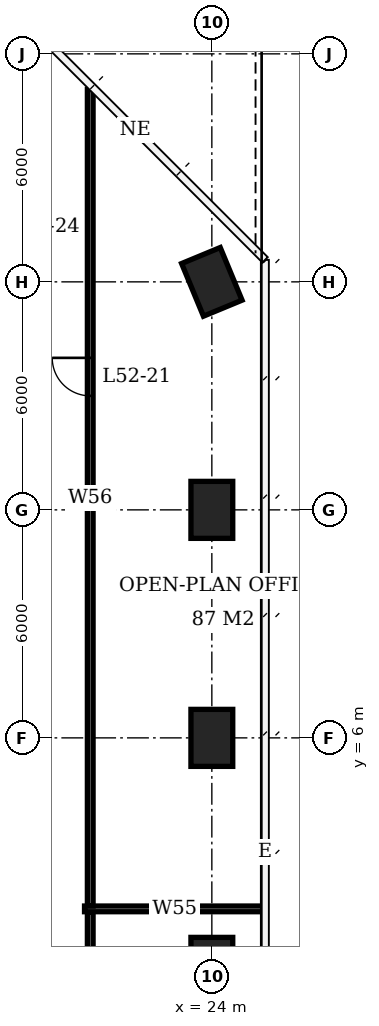
"""IFC4 building model, lengths in metres.
Left out: names, types, materials, properties, quantities, classifications, styles, units other than length and angle.
Written with IfcOpenShell. Run it as: python <this file> out.ifc"""

import sys

from ifc_helpers import new_model, si_unit, direction, frame, frame_2d, origin, origin_2d, place, context, subcontext, project, spatial, rectangle, extrude, element, fill, save


model = new_model("IFC4")
c1 = context("Model", 3, precision=1e-05, world=origin(), true_north=direction((0.0, 1.0)))
c2 = subcontext(c1, "Body", "Model", "MODEL_VIEW")
j1 = project(units=[si_unit("LENGTHUNIT", "METRE"), si_unit("PLANEANGLEUNIT", "RADIAN")], contexts=[c1])
p1 = place(None, origin())
s1 = spatial("IfcSite", under=j1, at=p1, CompositionType="ELEMENT")
p2 = place(p1, origin())
s2 = spatial("IfcBuilding", under=s1, at=p2, CompositionType="ELEMENT")
p3 = place(p2, frame((0.0, 0.0, 212.3)))
s3 = spatial("IfcBuildingStorey", under=s2, at=p3, CompositionType="ELEMENT", Elevation=212.3)
for number, where, z_axis, x_axis in (
    (1, (24.0, 0.0, 0.0), (0.0, 0.0, 1.0), (0.0, 1.0, 0.0)),
    (2, (24.0, 6.0, 0.0), (0.0, 0.0, 1.0), (0.0, 1.0, 0.0)),
    (3, (24.0, 12.0, 0.0), (0.0, 0.0, 1.0), (0.0, 1.0, 0.0)),
    (4, (24.0, 18.0, 0.0), (0.0, 0.0, 1.0), (0.383, -0.924, 0.0)),
):
    element("IfcColumn", number, at=place(p3, frame(where, z_axis=z_axis, x_axis=x_axis)), inside=s3, PredefinedType="COLUMN", context=c2, shape_type="SweptSolid", body=[
        extrude(rectangle(XDim=1.5, YDim=1.1, at=origin_2d()), origin(), (0.0, 0.0, 1.0), 3.9),
    ])
p4 = place(p3, frame((20.8, -11.29, 0.0), z_axis=(0.0, 0.0, 1.0), x_axis=(0.0, 1.0, 0.0)))
e5 = element("IfcWall", 5, at=p4, inside=s3, PredefinedType="PARTITIONING", context=c2, shape_type="SweptSolid", body=[
    extrude(rectangle(XDim=12.715, YDim=0.15, at=frame_2d((6.357, 0.0))), origin(), (0.0, 0.0, 1.0), 3.65),
])
p5 = place(p4, frame((5.801, 0.0, 0.0)))
e6 = element("IfcOpeningElement", 6, at=p5, cuts=e5, PredefinedType="OPENING", context=c2, shape_type="SweptSolid", body=[
    extrude(rectangle(XDim=1.0, YDim=2.1, at=frame_2d((0.5, 1.05))), frame((0.0, 0.085, 0.0), z_axis=(0.0, -1.0, 0.0), x_axis=(1.0, 0.0, 0.0)), (0.0, 0.0, 1.0), 0.17),
])
p6 = place(p3, frame((20.8, 1.575, 0.0), z_axis=(0.0, 0.0, 1.0), x_axis=(0.0, 1.0, 0.0)))
e7 = element("IfcWall", 7, at=p6, inside=s3, PredefinedType="PARTITIONING", context=c2, shape_type="SweptSolid", body=[
    extrude(rectangle(XDim=21.489, YDim=0.15, at=frame_2d((10.745, 0.0))), origin(), (0.0, 0.0, 1.0), 3.65),
])
p7 = place(p6, frame((13.425, 0.0, 0.0)))
e8 = element("IfcOpeningElement", 8, at=p7, cuts=e7, PredefinedType="OPENING", context=c2, shape_type="SweptSolid", body=[
    extrude(rectangle(XDim=1.0, YDim=2.1, at=frame_2d((0.5, 1.05))), frame((0.0, 0.085, 0.0), z_axis=(0.0, -1.0, 0.0), x_axis=(1.0, 0.0, 0.0)), (0.0, 0.0, 1.0), 0.17),
])
p8 = place(p3, frame((20.65, 1.5, 0.0), z_axis=(0.0, 0.0, 1.0), x_axis=(1.0, 0.0, 0.0)))
e9 = element("IfcWall", 9, at=p8, inside=s3, PredefinedType="PARTITIONING", context=c2, shape_type="SweptSolid", body=[
    extrude(rectangle(XDim=4.75, YDim=0.15, at=frame_2d((2.375, 0.0))), origin(), (0.0, 0.0, 1.0), 3.65),
])
p9 = place(p7, origin())
e10 = element("IfcDoor", 10, at=p9, inside=s3, OperationType="SINGLE_SWING_RIGHT", PredefinedType="DOOR", context=c2, shape_type="SweptSolid", body=[
    extrude(rectangle(XDim=1.0, YDim=2.1, at=frame_2d((0.5, 1.05))), frame((0.0, 0.025, 0.0), z_axis=(0.0, -1.0, 0.0), x_axis=(1.0, 0.0, 0.0)), (0.0, 0.0, 1.0), 0.05),
])
fill(e8, e10)
save(model, sys.argv[1])
